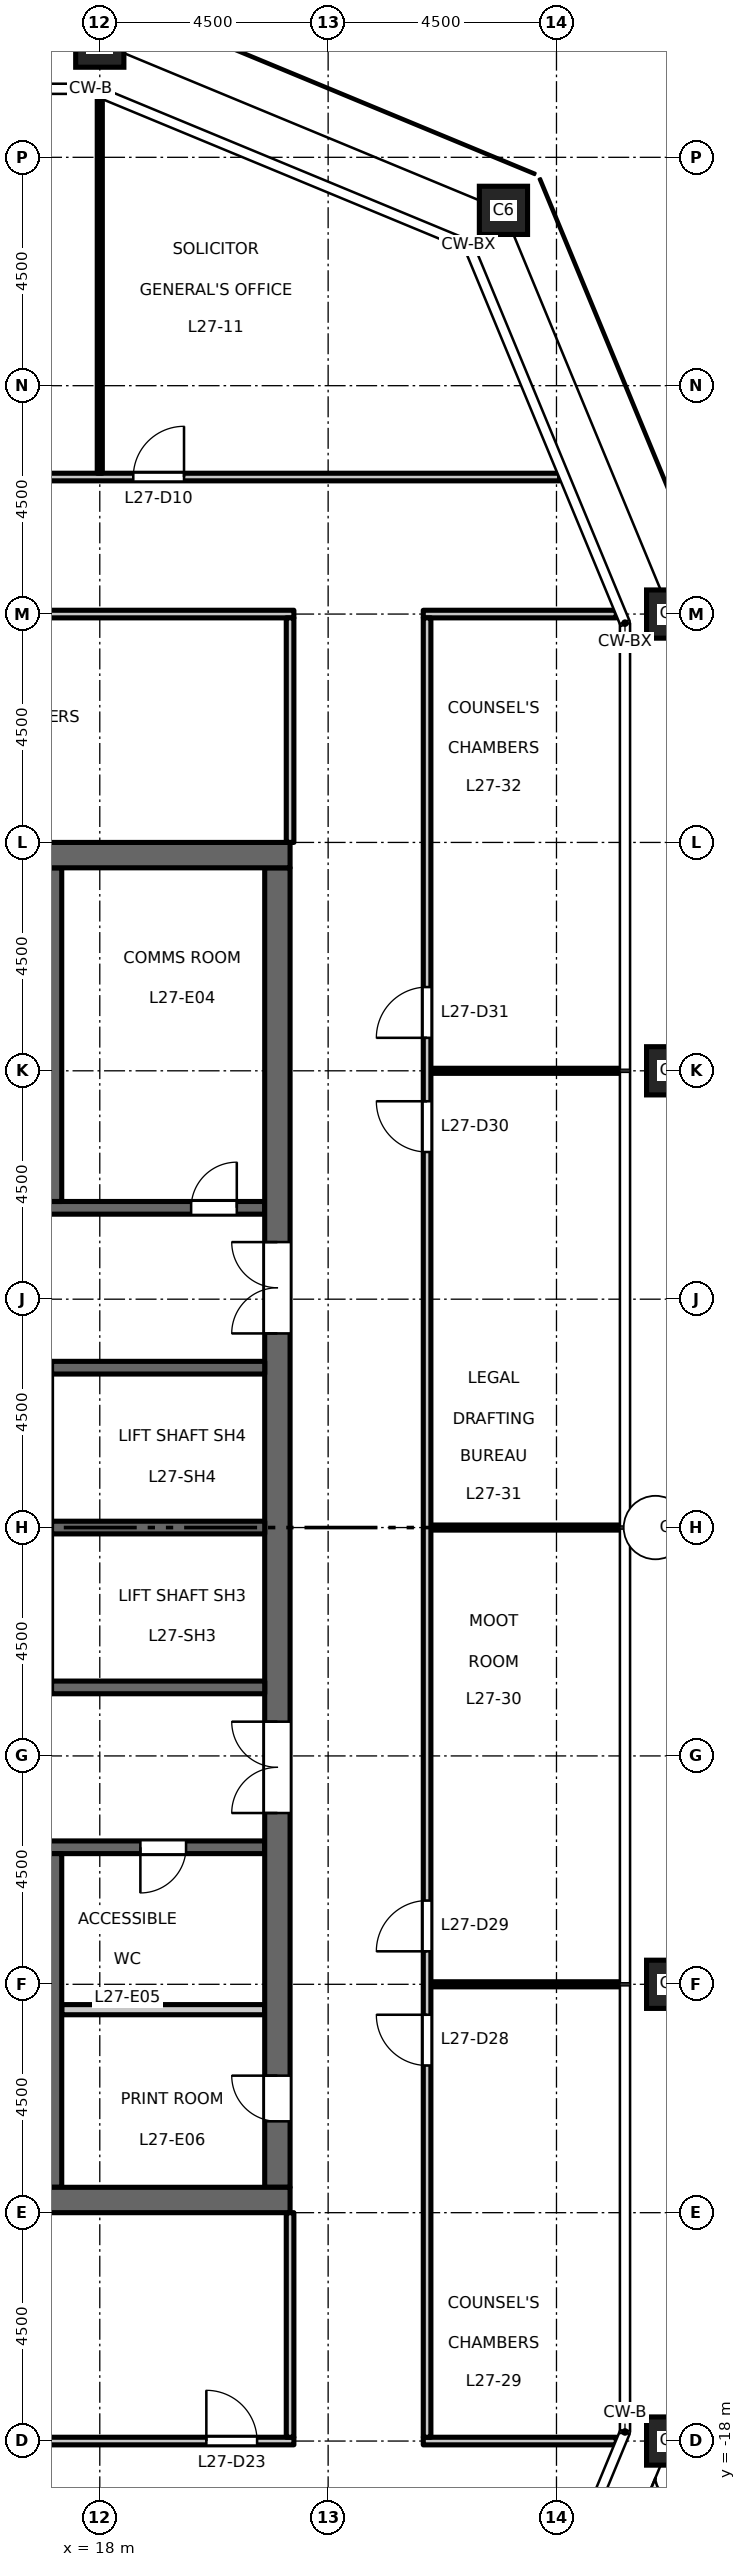
"""IFC4 building model, lengths in metres.
Left out: names, types, materials, properties, quantities, classifications, styles, units other than length and angle.
Written with IfcOpenShell. Run it as: python <this file> out.ifc"""

import sys

from ifc_helpers import new_model, si_unit, direction, frame, frame_2d, origin, origin_2d, place, context, subcontext, project, spatial, rectangle, hollow_rectangle, extrude, element, fill, save


model = new_model("IFC4")
c1 = context("Model", 3, precision=1e-05, world=origin(), true_north=direction((0.0, 1.0)))
c2 = subcontext(c1, "Body", "Model", "MODEL_VIEW")
j1 = project(units=[si_unit("LENGTHUNIT", "METRE"), si_unit("PLANEANGLEUNIT", "RADIAN")], contexts=[c1])
p1 = place(None, origin())
s1 = spatial("IfcSite", under=j1, at=p1, CompositionType="ELEMENT")
p2 = place(p1, origin())
s2 = spatial("IfcBuilding", under=s1, at=p2, CompositionType="ELEMENT")
p3 = place(p2, frame((0.0, 0.0, 127.2)))
s3 = spatial("IfcBuildingStorey", under=s2, at=p3, CompositionType="ELEMENT", Elevation=127.2)
for number, where, z_axis, x_axis in (
    (1, (29.25, -18.0, 0.0), (0.0, 0.0, 1.0), (1.0, 0.0, 0.0)),
    (2, (29.25, -9.0, 0.0), (0.0, 0.0, 1.0), (1.0, 0.0, 0.0)),
    (3, (29.25, 0.0, 0.0), (0.0, 0.0, 1.0), (1.0, 0.0, 0.0)),
    (4, (29.25, 9.0, 0.0), (0.0, 0.0, 1.0), (1.0, 0.0, 0.0)),
    (5, (29.25, 18.0, 0.0), (0.0, 0.0, 1.0), (1.0, 0.0, 0.0)),
    (6, (25.955, 25.955, 0.0), (0.0, 0.0, 1.0), (1.0, 0.0, 0.0)),
    (7, (18.0, 29.25, 0.0), (0.0, 0.0, 1.0), (1.0, 0.0, 0.0)),
):
    element("IfcColumn", number, at=place(p3, frame(where, z_axis=z_axis, x_axis=x_axis)), inside=s3, PredefinedType="COLUMN", context=c2, shape_type="SweptSolid", body=[
        extrude(hollow_rectangle(XDim=0.95, YDim=0.95, WallThickness=0.055, at=origin_2d()), origin(), (0.0, 0.0, 1.0), 4.5),
    ])
p4 = place(p3, frame((17.0, 6.3, 0.0), z_axis=(0.0, 0.0, 1.0), x_axis=(1.0, 0.0, 0.0)))
e8 = element("IfcWall", 8, at=p4, inside=s3, PredefinedType="SHEAR", context=c2, shape_type="SweptSolid", body=[
    extrude(rectangle(XDim=4.25, YDim=0.25, at=frame_2d((2.125, 0.0))), origin(), (0.0, 0.0, 1.0), 4.35),
])
p5 = place(p4, frame((2.8, 0.0, 0.0)))
e9 = element("IfcOpeningElement", 9, at=p5, cuts=e8, PredefinedType="OPENING", context=c2, shape_type="SweptSolid", body=[
    extrude(rectangle(XDim=0.9, YDim=2.1, at=frame_2d((0.45, 1.05))), frame((0.0, 0.135, 0.0), z_axis=(0.0, -1.0, 0.0), x_axis=(1.0, 0.0, 0.0)), (0.0, 0.0, 1.0), 0.27),
])
p6 = place(p3, frame((12.15, -6.3, 0.0), z_axis=(0.0, 0.0, 1.0), x_axis=(1.0, 0.0, 0.0)))
e10 = element("IfcWall", 10, at=p6, inside=s3, PredefinedType="SHEAR", context=c2, shape_type="SweptSolid", body=[
    extrude(rectangle(XDim=9.1, YDim=0.25, at=frame_2d((4.55, 0.0))), origin(), (0.0, 0.0, 1.0), 4.35),
])
p7 = place(p6, frame((1.8, 0.0, 0.0)))
e11 = element("IfcOpeningElement", 11, at=p7, cuts=e10, PredefinedType="OPENING", context=c2, shape_type="SweptSolid", body=[
    extrude(rectangle(XDim=1.0, YDim=2.1, at=frame_2d((0.5, 1.05))), frame((0.0, 0.135, 0.0), z_axis=(0.0, -1.0, 0.0), x_axis=(1.0, 0.0, 0.0)), (0.0, 0.0, 1.0), 0.27),
])
p8 = place(p6, frame((6.65, 0.0, 0.0)))
e12 = element("IfcOpeningElement", 12, at=p8, cuts=e10, PredefinedType="OPENING", context=c2, shape_type="SweptSolid", body=[
    extrude(rectangle(XDim=0.9, YDim=2.1, at=frame_2d((0.45, 1.05))), frame((0.0, 0.135, 0.0), z_axis=(0.0, -1.0, 0.0), x_axis=(1.0, 0.0, 0.0)), (0.0, 0.0, 1.0), 0.27),
])
p9 = place(p3, frame((21.5, -13.0, 0.0), z_axis=(0.0, 0.0, 1.0), x_axis=(0.0, 1.0, 0.0)))
e13 = element("IfcWall", 13, at=p9, inside=s3, PredefinedType="SHEAR", context=c2, shape_type="SweptSolid", body=[
    extrude(rectangle(XDim=26.0, YDim=0.5, at=frame_2d((13.0, 0.0))), origin(), (0.0, 0.0, 1.0), 4.35),
])
p10 = place(p9, frame((16.825, 0.0, 0.0)))
e14 = element("IfcOpeningElement", 14, at=p10, cuts=e13, PredefinedType="OPENING", context=c2, shape_type="SweptSolid", body=[
    extrude(rectangle(XDim=1.8, YDim=2.1, at=frame_2d((0.9, 1.05))), frame((0.0, 0.26, 0.0), z_axis=(0.0, -1.0, 0.0), x_axis=(1.0, 0.0, 0.0)), (0.0, 0.0, 1.0), 0.52),
])
p11 = place(p9, frame((7.375, 0.0, 0.0)))
e15 = element("IfcOpeningElement", 15, at=p11, cuts=e13, PredefinedType="OPENING", context=c2, shape_type="SweptSolid", body=[
    extrude(rectangle(XDim=1.8, YDim=2.1, at=frame_2d((0.9, 1.05))), frame((0.0, 0.26, 0.0), z_axis=(0.0, -1.0, 0.0), x_axis=(1.0, 0.0, 0.0)), (0.0, 0.0, 1.0), 0.52),
])
p12 = place(p9, frame((1.3, 0.0, 0.0)))
e16 = element("IfcOpeningElement", 16, at=p12, cuts=e13, PredefinedType="OPENING", context=c2, shape_type="SweptSolid", body=[
    extrude(rectangle(XDim=0.9, YDim=2.1, at=frame_2d((0.45, 1.05))), frame((0.0, 0.26, 0.0), z_axis=(0.0, -1.0, 0.0), x_axis=(1.0, 0.0, 0.0)), (0.0, 0.0, 1.0), 0.52),
])
p13 = place(p3, frame((17.25, -9.5, 0.0), z_axis=(0.0, 0.0, 1.0), x_axis=(1.0, 0.0, 0.0)))
e17 = element("IfcWall", 17, at=p13, inside=s3, PredefinedType="PARTITIONING", context=c2, shape_type="SweptSolid", body=[
    extrude(rectangle(XDim=4.0, YDim=0.2, at=frame_2d((2.0, 0.0))), origin(), (0.0, 0.0, 1.0), 4.35),
])
for number, where, z_axis, x_axis in (
    (18, (17.05, 0.0, 0.0), (0.0, 0.0, 1.0), (1.0, 0.0, 0.0)),
    (19, (17.05, 3.15, 0.0), (0.0, 0.0, 1.0), (1.0, 0.0, 0.0)),
    (20, (17.05, -3.15, 0.0), (0.0, 0.0, 1.0), (1.0, 0.0, 0.0)),
):
    element("IfcWall", number, at=place(p3, frame(where, z_axis=z_axis, x_axis=x_axis)), inside=s3, PredefinedType="SHEAR", context=c2, shape_type="SweptSolid", body=[
        extrude(rectangle(XDim=4.2, YDim=0.25, at=frame_2d((2.1, 0.0))), origin(), (0.0, 0.0, 1.0), 4.35),
    ])
for number, where, z_axis, x_axis in (
    (21, (17.0, 6.425, 0.0), (0.0, 0.0, 1.0), (0.0, 1.0, 0.0)),
    (22, (17.0, -13.0, 0.0), (0.0, 0.0, 1.0), (0.0, 1.0, 0.0)),
):
    element("IfcWall", number, at=place(p3, frame(where, z_axis=z_axis, x_axis=x_axis)), inside=s3, PredefinedType="SHEAR", context=c2, shape_type="SweptSolid", body=[
        extrude(rectangle(XDim=6.575, YDim=0.5, at=frame_2d((3.288, 0.0))), origin(), (0.0, 0.0, 1.0), 4.35),
    ])
for number, where, z_axis, x_axis in (
    (23, (8.25, 13.25, 0.0), (0.0, 0.0, 1.0), (1.0, 0.0, 0.0)),
    (24, (8.25, -13.25, 0.0), (0.0, 0.0, 1.0), (1.0, 0.0, 0.0)),
):
    element("IfcWall", number, at=place(p3, frame(where, z_axis=z_axis, x_axis=x_axis)), inside=s3, PredefinedType="SHEAR", context=c2, shape_type="SweptSolid", body=[
        extrude(rectangle(XDim=13.5, YDim=0.5, at=frame_2d((6.75, 0.0))), origin(), (0.0, 0.0, 1.0), 4.35),
    ])
p14 = place(p3, frame((-21.825, -18.0, 0.0), z_axis=(0.0, 0.0, 1.0), x_axis=(1.0, 0.0, 0.0)))
e25 = element("IfcWall", 25, at=p14, inside=s3, PredefinedType="PARTITIONING", context=c2, shape_type="SweptSolid", body=[
    extrude(rectangle(XDim=43.65, YDim=0.15, at=frame_2d((21.825, 0.0))), origin(), (0.0, 0.0, 1.0), 4.35),
])
p15 = place(p14, frame((14.175, 0.0, 0.0)))
e26 = element("IfcOpeningElement", 26, at=p15, cuts=e25, PredefinedType="OPENING", context=c2, shape_type="SweptSolid", body=[
    extrude(rectangle(XDim=1.0, YDim=2.1, at=frame_2d((0.5, 1.05))), frame((0.0, 0.085, 0.0), z_axis=(0.0, -1.0, 0.0), x_axis=(1.0, 0.0, 0.0)), (0.0, 0.0, 1.0), 0.17),
])
p16 = place(p14, frame((28.425, 0.0, 0.0)))
e27 = element("IfcOpeningElement", 27, at=p16, cuts=e25, PredefinedType="OPENING", context=c2, shape_type="SweptSolid", body=[
    extrude(rectangle(XDim=1.0, YDim=2.1, at=frame_2d((0.5, 1.05))), frame((0.0, 0.085, 0.0), z_axis=(0.0, -1.0, 0.0), x_axis=(1.0, 0.0, 0.0)), (0.0, 0.0, 1.0), 0.17),
])
p17 = place(p14, frame((0.675, 0.0, 0.0)))
e28 = element("IfcOpeningElement", 28, at=p17, cuts=e25, PredefinedType="OPENING", context=c2, shape_type="SweptSolid", body=[
    extrude(rectangle(XDim=1.0, YDim=2.1, at=frame_2d((0.5, 1.05))), frame((0.0, 0.085, 0.0), z_axis=(0.0, -1.0, 0.0), x_axis=(1.0, 0.0, 0.0)), (0.0, 0.0, 1.0), 0.17),
])
p18 = place(p14, frame((41.925, 0.0, 0.0)))
e29 = element("IfcOpeningElement", 29, at=p18, cuts=e25, PredefinedType="OPENING", context=c2, shape_type="SweptSolid", body=[
    extrude(rectangle(XDim=1.0, YDim=2.1, at=frame_2d((0.5, 1.05))), frame((0.0, 0.085, 0.0), z_axis=(0.0, -1.0, 0.0), x_axis=(1.0, 0.0, 0.0)), (0.0, 0.0, 1.0), 0.17),
])
p19 = place(p3, frame((24.375, -18.0, 0.0), z_axis=(0.0, 0.0, 1.0), x_axis=(1.0, 0.0, 0.0)))
e30 = element("IfcWall", 30, at=p19, inside=s3, PredefinedType="PARTITIONING", context=c2, shape_type="SweptSolid", body=[
    extrude(rectangle(XDim=3.803, YDim=0.15, at=frame_2d((1.901, 0.0))), origin(), (0.0, 0.0, 1.0), 4.35),
])
for number, where, z_axis, x_axis in (
    (31, (24.525, -9.0, 0.0), (0.0, 0.0, 1.0), (1.0, 0.0, 0.0)),
    (32, (24.525, 0.0, 0.0), (0.0, 0.0, 1.0), (1.0, 0.0, 0.0)),
    (33, (24.525, 9.0, 0.0), (0.0, 0.0, 1.0), (1.0, 0.0, 0.0)),
):
    element("IfcWall", number, at=place(p3, frame(where, z_axis=z_axis, x_axis=x_axis)), inside=s3, PredefinedType="PARTITIONING", context=c2, shape_type="SweptSolid", body=[
        extrude(rectangle(XDim=3.735, YDim=0.1, at=frame_2d((1.868, 0.0))), origin(), (0.0, 0.0, 1.0), 4.35),
    ])
p20 = place(p3, frame((-21.825, 18.0, 0.0), z_axis=(0.0, 0.0, 1.0), x_axis=(1.0, 0.0, 0.0)))
e34 = element("IfcWall", 34, at=p20, inside=s3, PredefinedType="PARTITIONING", context=c2, shape_type="SweptSolid", body=[
    extrude(rectangle(XDim=43.65, YDim=0.15, at=frame_2d((21.825, 0.0))), origin(), (0.0, 0.0, 1.0), 4.35),
])
p21 = place(p20, frame((14.225, 0.0, 0.0)))
e35 = element("IfcOpeningElement", 35, at=p21, cuts=e34, PredefinedType="OPENING", context=c2, shape_type="SweptSolid", body=[
    extrude(rectangle(XDim=1.0, YDim=2.1, at=frame_2d((0.5, 1.05))), frame((0.0, 0.085, 0.0), z_axis=(0.0, -1.0, 0.0), x_axis=(1.0, 0.0, 0.0)), (0.0, 0.0, 1.0), 0.17),
])
p22 = place(p20, frame((11.975, 0.0, 0.0)))
e36 = element("IfcOpeningElement", 36, at=p22, cuts=e34, PredefinedType="OPENING", context=c2, shape_type="SweptSolid", body=[
    extrude(rectangle(XDim=1.0, YDim=2.1, at=frame_2d((0.5, 1.05))), frame((0.0, 0.085, 0.0), z_axis=(0.0, -1.0, 0.0), x_axis=(1.0, 0.0, 0.0)), (0.0, 0.0, 1.0), 0.17),
])
p23 = place(p20, frame((30.725, 0.0, 0.0)))
e37 = element("IfcOpeningElement", 37, at=p23, cuts=e34, PredefinedType="OPENING", context=c2, shape_type="SweptSolid", body=[
    extrude(rectangle(XDim=1.0, YDim=2.1, at=frame_2d((0.5, 1.05))), frame((0.0, 0.085, 0.0), z_axis=(0.0, -1.0, 0.0), x_axis=(1.0, 0.0, 0.0)), (0.0, 0.0, 1.0), 0.17),
])
p24 = place(p3, frame((24.375, 18.0, 0.0), z_axis=(0.0, 0.0, 1.0), x_axis=(1.0, 0.0, 0.0)))
e38 = element("IfcWall", 38, at=p24, inside=s3, PredefinedType="PARTITIONING", context=c2, shape_type="SweptSolid", body=[
    extrude(rectangle(XDim=3.803, YDim=0.15, at=frame_2d((1.901, 0.0))), origin(), (0.0, 0.0, 1.0), 4.35),
])
p25 = place(p3, frame((-27.06, 20.7, 0.0), z_axis=(0.0, 0.0, 1.0), x_axis=(1.0, 0.0, 0.0)))
e39 = element("IfcWall", 39, at=p25, inside=s3, PredefinedType="PARTITIONING", context=c2, shape_type="SweptSolid", body=[
    extrude(rectangle(XDim=54.12, YDim=0.15, at=frame_2d((27.06, 0.0))), origin(), (0.0, 0.0, 1.0), 4.35),
])
p26 = place(p25, frame((16.41, 0.0, 0.0)))
e40 = element("IfcOpeningElement", 40, at=p26, cuts=e39, PredefinedType="OPENING", context=c2, shape_type="SweptSolid", body=[
    extrude(rectangle(XDim=1.0, YDim=2.1, at=frame_2d((0.5, 1.05))), frame((0.0, 0.085, 0.0), z_axis=(0.0, -1.0, 0.0), x_axis=(1.0, 0.0, 0.0)), (0.0, 0.0, 1.0), 0.17),
])
p27 = place(p25, frame((18.66, 0.0, 0.0)))
e41 = element("IfcOpeningElement", 41, at=p27, cuts=e39, PredefinedType="OPENING", context=c2, shape_type="SweptSolid", body=[
    extrude(rectangle(XDim=1.0, YDim=2.1, at=frame_2d((0.5, 1.05))), frame((0.0, 0.085, 0.0), z_axis=(0.0, -1.0, 0.0), x_axis=(1.0, 0.0, 0.0)), (0.0, 0.0, 1.0), 0.17),
])
p28 = place(p25, frame((34.41, 0.0, 0.0)))
e42 = element("IfcOpeningElement", 42, at=p28, cuts=e39, PredefinedType="OPENING", context=c2, shape_type="SweptSolid", body=[
    extrude(rectangle(XDim=1.0, YDim=2.1, at=frame_2d((0.5, 1.05))), frame((0.0, 0.085, 0.0), z_axis=(0.0, -1.0, 0.0), x_axis=(1.0, 0.0, 0.0)), (0.0, 0.0, 1.0), 0.17),
])
p29 = place(p25, frame((36.66, 0.0, 0.0)))
e43 = element("IfcOpeningElement", 43, at=p29, cuts=e39, PredefinedType="OPENING", context=c2, shape_type="SweptSolid", body=[
    extrude(rectangle(XDim=1.0, YDim=2.1, at=frame_2d((0.5, 1.05))), frame((0.0, 0.085, 0.0), z_axis=(0.0, -1.0, 0.0), x_axis=(1.0, 0.0, 0.0)), (0.0, 0.0, 1.0), 0.17),
])
p30 = place(p25, frame((7.41, 0.0, 0.0)))
e44 = element("IfcOpeningElement", 44, at=p30, cuts=e39, PredefinedType="OPENING", context=c2, shape_type="SweptSolid", body=[
    extrude(rectangle(XDim=1.0, YDim=2.1, at=frame_2d((0.5, 1.05))), frame((0.0, 0.085, 0.0), z_axis=(0.0, -1.0, 0.0), x_axis=(1.0, 0.0, 0.0)), (0.0, 0.0, 1.0), 0.17),
])
p31 = place(p25, frame((45.72, 0.0, 0.0)))
e45 = element("IfcOpeningElement", 45, at=p31, cuts=e39, PredefinedType="OPENING", context=c2, shape_type="SweptSolid", body=[
    extrude(rectangle(XDim=1.0, YDim=2.1, at=frame_2d((0.5, 1.05))), frame((0.0, 0.085, 0.0), z_axis=(0.0, -1.0, 0.0), x_axis=(1.0, 0.0, 0.0)), (0.0, 0.0, 1.0), 0.17),
])
p32 = place(p3, frame((18.0, 20.775, 0.0), z_axis=(0.0, 0.0, 1.0), x_axis=(0.0, 1.0, 0.0)))
e46 = element("IfcWall", 46, at=p32, inside=s3, PredefinedType="PARTITIONING", context=c2, shape_type="SweptSolid", body=[
    extrude(rectangle(XDim=7.403, YDim=0.1, at=frame_2d((3.702, 0.0))), origin(), (0.0, 0.0, 1.0), 3.45),
])
for number, where, z_axis, x_axis in (
    (47, (21.75, -17.925, 0.0), (0.0, 0.0, 1.0), (0.0, 1.0, 0.0)),
    (48, (21.75, 13.5, 0.0), (0.0, 0.0, 1.0), (0.0, 1.0, 0.0)),
):
    element("IfcWall", number, at=place(p3, frame(where, z_axis=z_axis, x_axis=x_axis)), inside=s3, PredefinedType="PARTITIONING", context=c2, shape_type="SweptSolid", body=[
        extrude(rectangle(XDim=4.425, YDim=0.15, at=frame_2d((2.212, 0.0))), origin(), (0.0, 0.0, 1.0), 4.35),
    ])
p33 = place(p3, frame((24.45, -17.925, 0.0), z_axis=(0.0, 0.0, 1.0), x_axis=(0.0, 1.0, 0.0)))
e49 = element("IfcWall", 49, at=p33, inside=s3, PredefinedType="PARTITIONING", context=c2, shape_type="SweptSolid", body=[
    extrude(rectangle(XDim=35.85, YDim=0.15, at=frame_2d((17.925, 0.0))), origin(), (0.0, 0.0, 1.0), 4.35),
])
p34 = place(p33, frame((7.325, 0.0, 0.0)))
e50 = element("IfcOpeningElement", 50, at=p34, cuts=e49, PredefinedType="OPENING", context=c2, shape_type="SweptSolid", body=[
    extrude(rectangle(XDim=1.0, YDim=2.1, at=frame_2d((0.5, 1.05))), frame((0.0, 0.085, 0.0), z_axis=(0.0, -1.0, 0.0), x_axis=(1.0, 0.0, 0.0)), (0.0, 0.0, 1.0), 0.17),
])
p35 = place(p33, frame((9.575, 0.0, 0.0)))
e51 = element("IfcOpeningElement", 51, at=p35, cuts=e49, PredefinedType="OPENING", context=c2, shape_type="SweptSolid", body=[
    extrude(rectangle(XDim=1.0, YDim=2.1, at=frame_2d((0.5, 1.05))), frame((0.0, 0.085, 0.0), z_axis=(0.0, -1.0, 0.0), x_axis=(1.0, 0.0, 0.0)), (0.0, 0.0, 1.0), 0.17),
])
p36 = place(p33, frame((25.325, 0.0, 0.0)))
e52 = element("IfcOpeningElement", 52, at=p36, cuts=e49, PredefinedType="OPENING", context=c2, shape_type="SweptSolid", body=[
    extrude(rectangle(XDim=1.0, YDim=2.1, at=frame_2d((0.5, 1.05))), frame((0.0, 0.085, 0.0), z_axis=(0.0, -1.0, 0.0), x_axis=(1.0, 0.0, 0.0)), (0.0, 0.0, 1.0), 0.17),
])
p37 = place(p33, frame((27.575, 0.0, 0.0)))
e53 = element("IfcOpeningElement", 53, at=p37, cuts=e49, PredefinedType="OPENING", context=c2, shape_type="SweptSolid", body=[
    extrude(rectangle(XDim=1.0, YDim=2.1, at=frame_2d((0.5, 1.05))), frame((0.0, 0.085, 0.0), z_axis=(0.0, -1.0, 0.0), x_axis=(1.0, 0.0, 0.0)), (0.0, 0.0, 1.0), 0.17),
])
p38 = place(p10, origin())
e54 = element("IfcDoor", 54, at=p38, inside=s3, OperationType="DOUBLE_DOOR_DOUBLE_SWING", PredefinedType="DOOR", context=c2, shape_type="SweptSolid", body=[
    extrude(rectangle(XDim=1.8, YDim=2.1, at=frame_2d((0.9, 1.05))), frame((0.0, 0.025, 0.0), z_axis=(0.0, -1.0, 0.0), x_axis=(1.0, 0.0, 0.0)), (0.0, 0.0, 1.0), 0.05),
])
fill(e14, e54)
p39 = place(p11, origin())
e55 = element("IfcDoor", 55, at=p39, inside=s3, OperationType="DOUBLE_DOOR_DOUBLE_SWING", PredefinedType="DOOR", context=c2, shape_type="SweptSolid", body=[
    extrude(rectangle(XDim=1.8, YDim=2.1, at=frame_2d((0.9, 1.05))), frame((0.0, 0.025, 0.0), z_axis=(0.0, -1.0, 0.0), x_axis=(1.0, 0.0, 0.0)), (0.0, 0.0, 1.0), 0.05),
])
fill(e15, e55)
p40 = place(p5, origin())
e56 = element("IfcDoor", 56, at=p40, inside=s3, OperationType="SINGLE_SWING_LEFT", PredefinedType="DOOR", context=c2, shape_type="SweptSolid", body=[
    extrude(rectangle(XDim=0.9, YDim=2.1, at=frame_2d((0.45, 1.05))), frame((0.0, 0.025, 0.0), z_axis=(0.0, -1.0, 0.0), x_axis=(1.0, 0.0, 0.0)), (0.0, 0.0, 1.0), 0.05),
])
fill(e9, e56)
p41 = place(p8, origin())
e57 = element("IfcDoor", 57, at=p41, inside=s3, OperationType="SINGLE_SWING_LEFT", PredefinedType="DOOR", context=c2, shape_type="SweptSolid", body=[
    extrude(rectangle(XDim=0.9, YDim=2.1, at=frame_2d((0.45, 1.05))), frame((0.0, 0.025, 0.0), z_axis=(0.0, -1.0, 0.0), x_axis=(1.0, 0.0, 0.0)), (0.0, 0.0, 1.0), 0.05),
])
fill(e12, e57)
p42 = place(p12, origin())
e58 = element("IfcDoor", 58, at=p42, inside=s3, OperationType="SINGLE_SWING_LEFT", PredefinedType="DOOR", context=c2, shape_type="SweptSolid", body=[
    extrude(rectangle(XDim=0.9, YDim=2.1, at=frame_2d((0.45, 1.05))), frame((0.0, 0.025, 0.0), z_axis=(0.0, -1.0, 0.0), x_axis=(1.0, 0.0, 0.0)), (0.0, 0.0, 1.0), 0.05),
])
fill(e16, e58)
p43 = place(p31, origin())
e59 = element("IfcDoor", 59, at=p43, inside=s3, OperationType="SINGLE_SWING_RIGHT", PredefinedType="DOOR", context=c2, shape_type="SweptSolid", body=[
    extrude(rectangle(XDim=1.0, YDim=2.1, at=frame_2d((0.5, 1.05))), frame((0.0, 0.025, 0.0), z_axis=(0.0, -1.0, 0.0), x_axis=(1.0, 0.0, 0.0)), (0.0, 0.0, 1.0), 0.05),
])
fill(e45, e59)
p44 = place(p18, origin())
e60 = element("IfcDoor", 60, at=p44, inside=s3, OperationType="SINGLE_SWING_LEFT", PredefinedType="DOOR", context=c2, shape_type="SweptSolid", body=[
    extrude(rectangle(XDim=1.0, YDim=2.1, at=frame_2d((0.5, 1.05))), frame((0.0, 0.025, 0.0), z_axis=(0.0, -1.0, 0.0), x_axis=(1.0, 0.0, 0.0)), (0.0, 0.0, 1.0), 0.05),
])
fill(e29, e60)
p45 = place(p34, origin())
e61 = element("IfcDoor", 61, at=p45, inside=s3, OperationType="SINGLE_SWING_RIGHT", PredefinedType="DOOR", context=c2, shape_type="SweptSolid", body=[
    extrude(rectangle(XDim=1.0, YDim=2.1, at=frame_2d((0.5, 1.05))), frame((0.0, 0.025, 0.0), z_axis=(0.0, -1.0, 0.0), x_axis=(1.0, 0.0, 0.0)), (0.0, 0.0, 1.0), 0.05),
])
fill(e50, e61)
p46 = place(p35, origin())
e62 = element("IfcDoor", 62, at=p46, inside=s3, OperationType="SINGLE_SWING_LEFT", PredefinedType="DOOR", context=c2, shape_type="SweptSolid", body=[
    extrude(rectangle(XDim=1.0, YDim=2.1, at=frame_2d((0.5, 1.05))), frame((0.0, 0.025, 0.0), z_axis=(0.0, -1.0, 0.0), x_axis=(1.0, 0.0, 0.0)), (0.0, 0.0, 1.0), 0.05),
])
fill(e51, e62)
p47 = place(p36, origin())
e63 = element("IfcDoor", 63, at=p47, inside=s3, OperationType="SINGLE_SWING_RIGHT", PredefinedType="DOOR", context=c2, shape_type="SweptSolid", body=[
    extrude(rectangle(XDim=1.0, YDim=2.1, at=frame_2d((0.5, 1.05))), frame((0.0, 0.025, 0.0), z_axis=(0.0, -1.0, 0.0), x_axis=(1.0, 0.0, 0.0)), (0.0, 0.0, 1.0), 0.05),
])
fill(e52, e63)
p48 = place(p37, origin())
e64 = element("IfcDoor", 64, at=p48, inside=s3, OperationType="SINGLE_SWING_LEFT", PredefinedType="DOOR", context=c2, shape_type="SweptSolid", body=[
    extrude(rectangle(XDim=1.0, YDim=2.1, at=frame_2d((0.5, 1.05))), frame((0.0, 0.025, 0.0), z_axis=(0.0, -1.0, 0.0), x_axis=(1.0, 0.0, 0.0)), (0.0, 0.0, 1.0), 0.05),
])
fill(e53, e64)
save(model, sys.argv[1])
